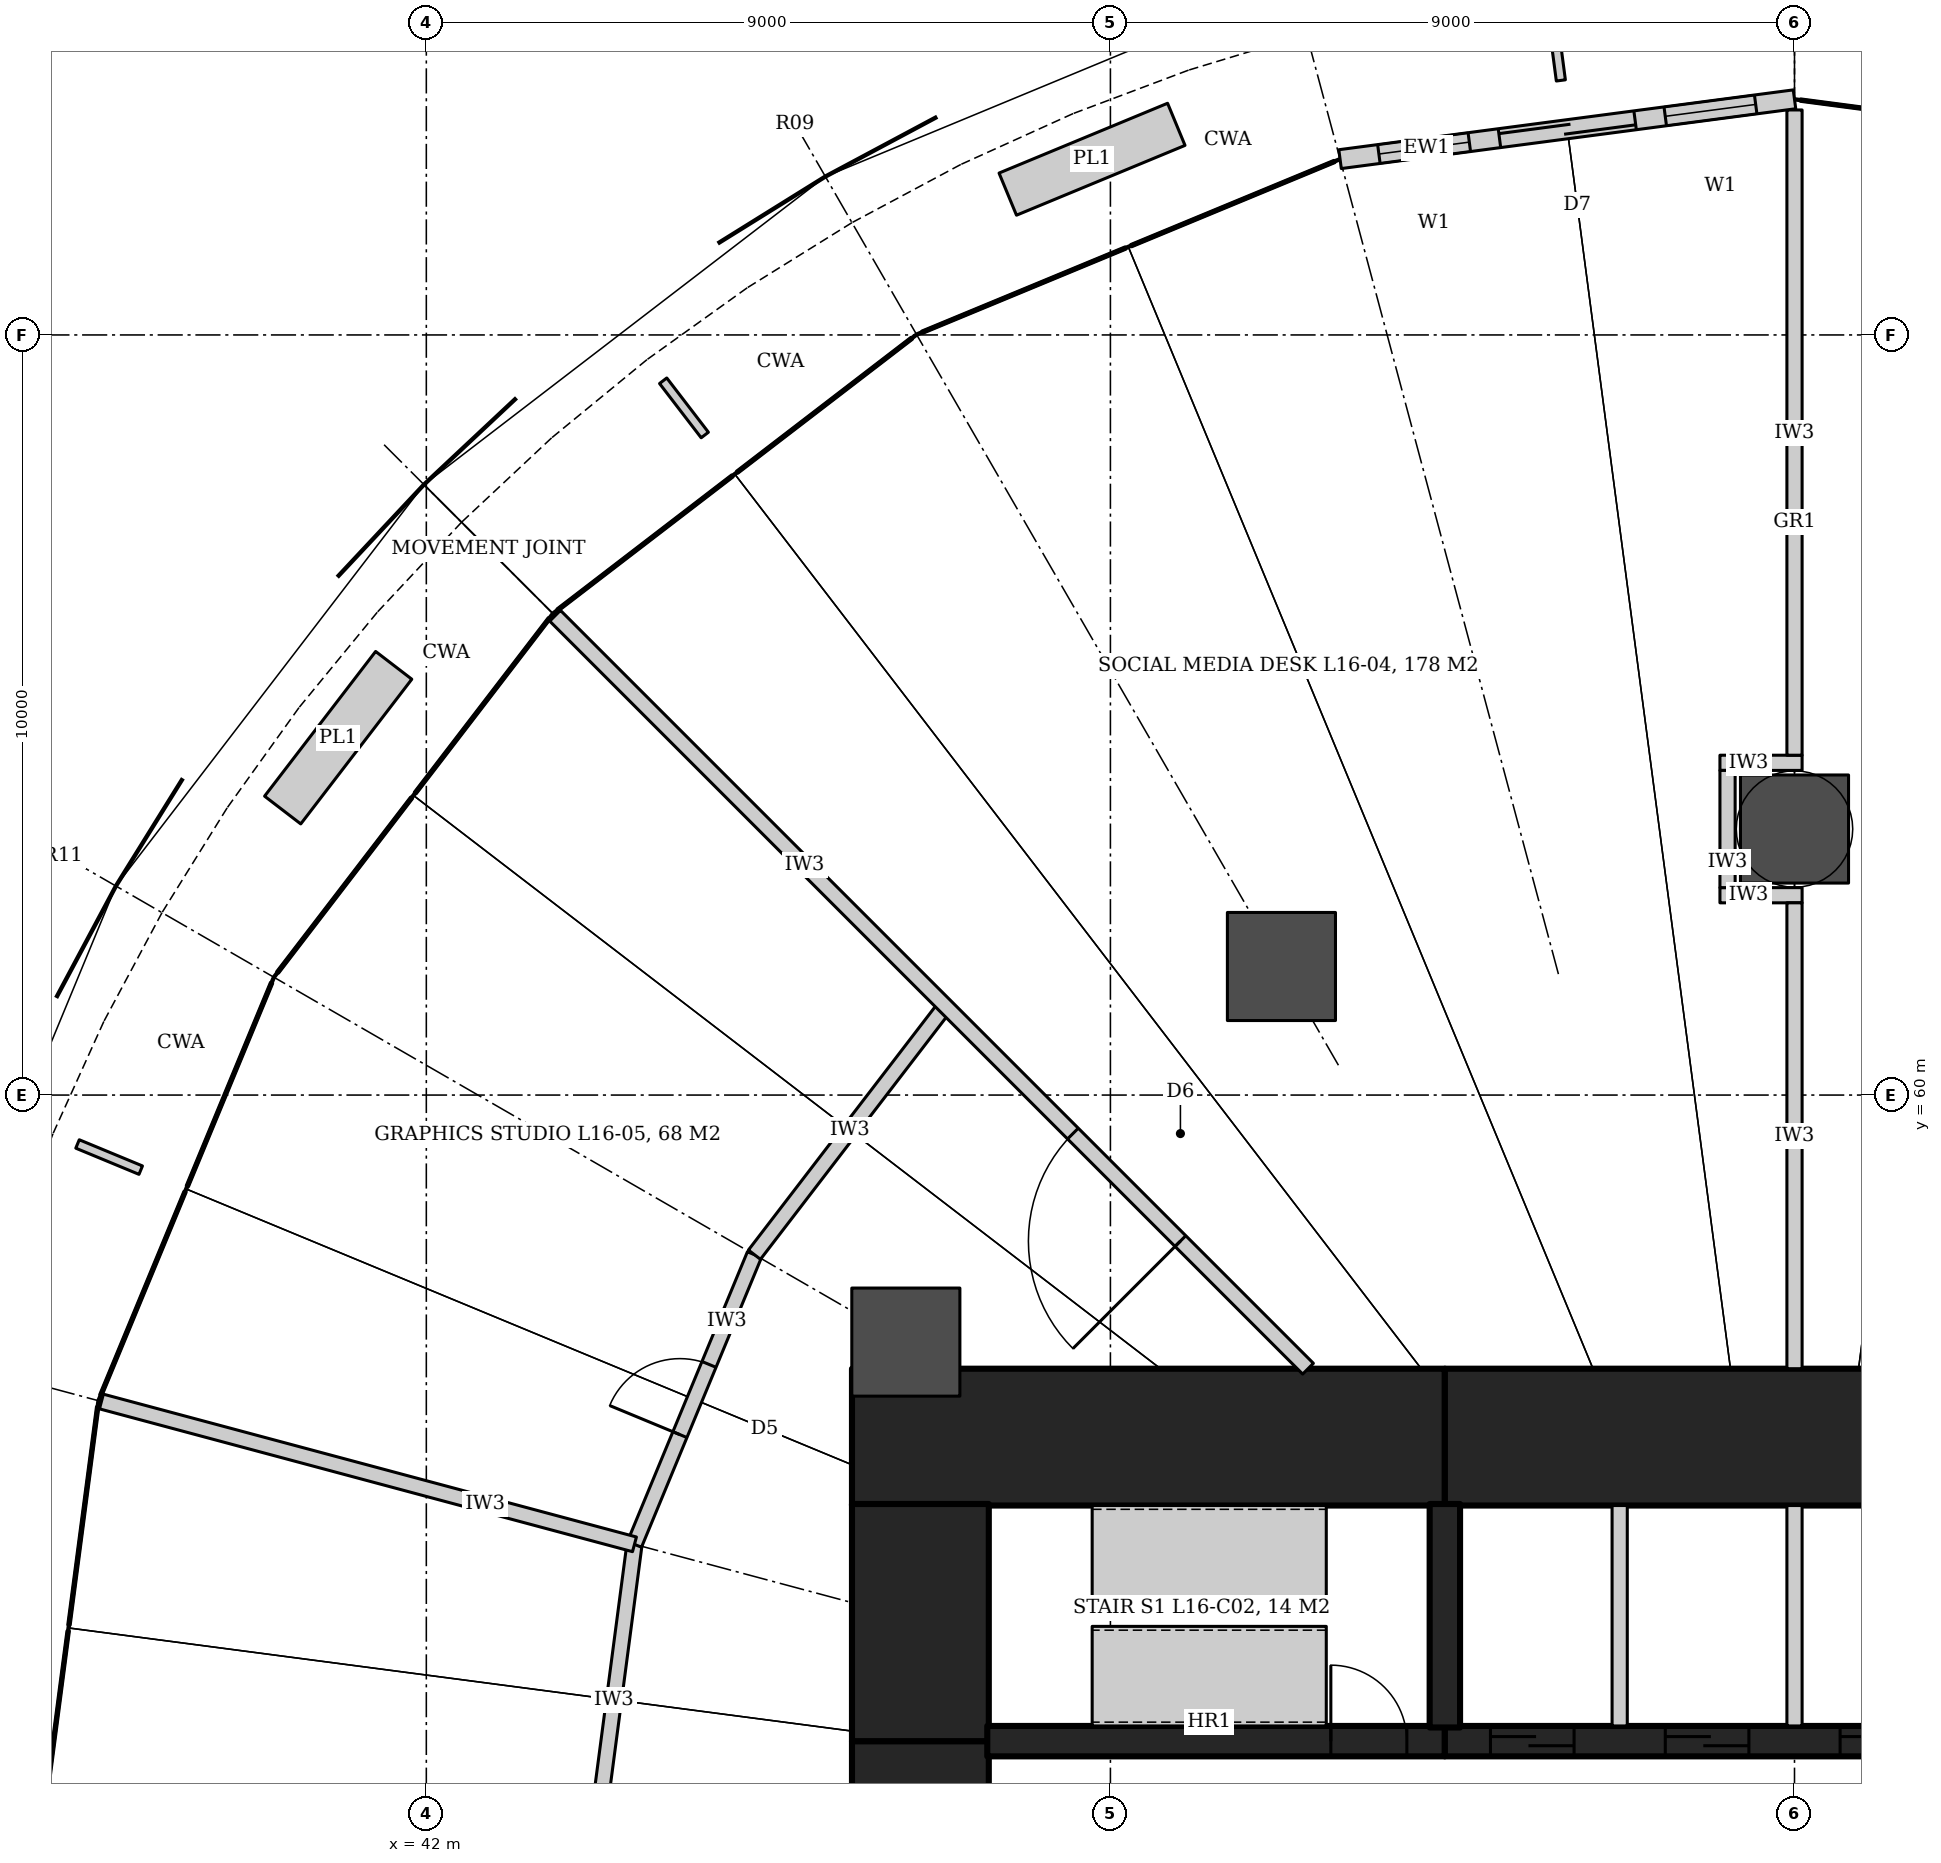
"""IFC4 building model, lengths in metres.
Left out: names, types, materials, properties, quantities, classifications, styles, units other than length and angle.
Written with IfcOpenShell. Run it as: python <this file> out.ifc"""

import sys

from ifc_helpers import new_model, si_unit, direction, frame, frame_2d, origin, origin_2d, place, context, subcontext, project, spatial, rectangle, hollow_circle, extrude, element, fill, save


model = new_model("IFC4")
c1 = context("Model", 3, precision=1e-05, world=origin(), true_north=direction((0.0, 1.0)))
c2 = subcontext(c1, "Body", "Model", "MODEL_VIEW")
j1 = project(units=[si_unit("LENGTHUNIT", "METRE"), si_unit("PLANEANGLEUNIT", "RADIAN")], contexts=[c1])
p1 = place(None, origin())
s1 = spatial("IfcSite", under=j1, at=p1, CompositionType="ELEMENT")
p2 = place(p1, origin())
s2 = spatial("IfcBuilding", under=s1, at=p2, CompositionType="ELEMENT")
p3 = place(p2, frame((0.0, 0.0, 68.0)))
s3 = spatial("IfcBuildingStorey", under=s2, at=p3, CompositionType="ELEMENT", Elevation=68.0)
p4 = place(p3, frame((47.6, 55.5, 0.0), z_axis=(0.0, 0.0, 1.0), x_axis=(1.0, 0.0, 0.0)))
e1 = element("IfcWall", 1, at=p4, inside=s3, PredefinedType="SHEAR", context=c2, shape_type="SweptSolid", body=[
    extrude(rectangle(XDim=7.8, YDim=1.8, at=frame_2d((3.9, 0.0))), origin(), (0.0, 0.0, 1.0), 4.2),
])
p5 = place(p3, frame((55.4, 55.5, 0.0), z_axis=(0.0, 0.0, 1.0), x_axis=(1.0, 0.0, 0.0)))
e2 = element("IfcWall", 2, at=p5, inside=s3, PredefinedType="SHEAR", context=c2, shape_type="SweptSolid", body=[
    extrude(rectangle(XDim=9.2, YDim=1.8, at=frame_2d((4.6, 0.0))), origin(), (0.0, 0.0, 1.0), 4.2),
])
p6 = place(p3, frame((48.5, 48.5, 0.0), z_axis=(0.0, 0.0, 1.0), x_axis=(0.0, 1.0, 0.0)))
e3 = element("IfcWall", 3, at=p6, inside=s3, PredefinedType="SHEAR", context=c2, shape_type="SweptSolid", body=[
    extrude(rectangle(XDim=3.0, YDim=1.8, at=frame_2d((1.5, 0.0))), origin(), (0.0, 0.0, 1.0), 4.2),
])
p7 = place(p6, frame((0.6, 0.0, 0.0)))
e4 = element("IfcOpeningElement", 4, at=p7, cuts=e3, PredefinedType="OPENING", context=c2, shape_type="SweptSolid", body=[
    extrude(rectangle(XDim=1.8, YDim=2.1, at=frame_2d((0.9, 1.05))), frame((0.0, 0.91, 0.0), z_axis=(0.0, -1.0, 0.0), x_axis=(1.0, 0.0, 0.0)), (0.0, 0.0, 1.0), 1.82),
])
p8 = place(p3, frame((48.5, 51.5, 0.0), z_axis=(0.0, 0.0, 1.0), x_axis=(0.0, 1.0, 0.0)))
e5 = element("IfcWall", 5, at=p8, inside=s3, PredefinedType="SHEAR", context=c2, shape_type="SweptSolid", body=[
    extrude(rectangle(XDim=3.12, YDim=1.8, at=frame_2d((1.56, 0.0))), origin(), (0.0, 0.0, 1.0), 4.2),
])
p9 = place(p3, frame((49.38, 51.5, 0.0), z_axis=(0.0, 0.0, 1.0), x_axis=(1.0, 0.0, 0.0)))
e6 = element("IfcWall", 6, at=p9, inside=s3, PredefinedType="SHEAR", context=c2, shape_type="SweptSolid", body=[
    extrude(rectangle(XDim=6.02, YDim=0.4, at=frame_2d((3.01, 0.0))), origin(), (0.0, 0.0, 1.0), 4.2),
])
p10 = place(p9, frame((4.52, 0.0, 0.0)))
e7 = element("IfcOpeningElement", 7, at=p10, cuts=e6, PredefinedType="OPENING", context=c2, shape_type="SweptSolid", body=[
    extrude(rectangle(XDim=1.0, YDim=2.1, at=frame_2d((0.5, 1.05))), frame((0.0, 0.21, 0.0), z_axis=(0.0, -1.0, 0.0), x_axis=(1.0, 0.0, 0.0)), (0.0, 0.0, 1.0), 0.42),
])
p11 = place(p3, frame((55.4, 51.5, 0.0), z_axis=(0.0, 0.0, 1.0), x_axis=(1.0, 0.0, 0.0)))
e8 = element("IfcWall", 8, at=p11, inside=s3, PredefinedType="SHEAR", context=c2, shape_type="SweptSolid", body=[
    extrude(rectangle(XDim=9.2, YDim=0.4, at=frame_2d((4.6, 0.0))), origin(), (0.0, 0.0, 1.0), 4.2),
])
p12 = place(p11, frame((0.6, 0.0, 0.0)))
e9 = element("IfcOpeningElement", 9, at=p12, cuts=e8, PredefinedType="OPENING", context=c2, shape_type="SweptSolid", body=[
    extrude(rectangle(XDim=1.1, YDim=2.1, at=frame_2d((0.55, 1.05))), frame((0.0, 0.21, 0.0), z_axis=(0.0, -1.0, 0.0), x_axis=(1.0, 0.0, 0.0)), (0.0, 0.0, 1.0), 0.42),
])
p13 = place(p11, frame((2.9, 0.0, 0.0)))
e10 = element("IfcOpeningElement", 10, at=p13, cuts=e8, PredefinedType="OPENING", context=c2, shape_type="SweptSolid", body=[
    extrude(rectangle(XDim=1.1, YDim=2.1, at=frame_2d((0.55, 1.05))), frame((0.0, 0.21, 0.0), z_axis=(0.0, -1.0, 0.0), x_axis=(1.0, 0.0, 0.0)), (0.0, 0.0, 1.0), 0.42),
])
p14 = place(p11, frame((5.2, 0.0, 0.0)))
e11 = element("IfcOpeningElement", 11, at=p14, cuts=e8, PredefinedType="OPENING", context=c2, shape_type="SweptSolid", body=[
    extrude(rectangle(XDim=1.1, YDim=2.1, at=frame_2d((0.55, 1.05))), frame((0.0, 0.21, 0.0), z_axis=(0.0, -1.0, 0.0), x_axis=(1.0, 0.0, 0.0)), (0.0, 0.0, 1.0), 0.42),
])
p15 = place(p11, frame((7.5, 0.0, 0.0)))
e12 = element("IfcOpeningElement", 12, at=p15, cuts=e8, PredefinedType="OPENING", context=c2, shape_type="SweptSolid", body=[
    extrude(rectangle(XDim=1.1, YDim=2.1, at=frame_2d((0.55, 1.05))), frame((0.0, 0.21, 0.0), z_axis=(0.0, -1.0, 0.0), x_axis=(1.0, 0.0, 0.0)), (0.0, 0.0, 1.0), 0.42),
])
p16 = place(p3, frame((55.4, 51.68, 0.0), z_axis=(0.0, 0.0, 1.0), x_axis=(0.0, 1.0, 0.0)))
e13 = element("IfcWall", 13, at=p16, inside=s3, PredefinedType="SHEAR", context=c2, shape_type="SweptSolid", body=[
    extrude(rectangle(XDim=2.94, YDim=0.4, at=frame_2d((1.47, 0.0))), origin(), (0.0, 0.0, 1.0), 4.2),
])
for number, where, z_axis, x_axis in (
    (14, (60.0, 63.5, 0.0), (0.0, 0.0, 1.0), (1.0, 0.0, 0.0)),
    (15, (53.25, 61.691, 0.0), (0.0, 0.0, 1.0), (1.0, 0.0, 0.0)),
    (16, (48.309, 56.75, 0.0), (0.0, 0.0, 1.0), (1.0, 0.0, 0.0)),
):
    element("IfcColumn", number, at=place(p3, frame(where, z_axis=z_axis, x_axis=x_axis)), inside=s3, PredefinedType="COLUMN", context=c2, shape_type="SweptSolid", body=[
        extrude(hollow_circle(Radius=0.711, WallThickness=0.07, at=origin_2d()), origin(), (0.0, 0.0, 1.0), 4.2),
    ])
p17 = place(p3, frame((44.2, 50.0, 0.0), z_axis=(0.0, 0.0, 1.0), x_axis=(0.130515758099, 0.991446234996, 0.0)))
e17 = element("IfcWall", 17, at=p17, inside=s3, PredefinedType="PARTITIONING", context=c2, shape_type="SweptSolid", body=[
    extrude(rectangle(XDim=4.125, YDim=0.2, at=frame_2d((2.062, 0.0))), origin(), (0.0, 0.0, 1.0), 3.04),
])
p18 = place(p3, frame((44.738, 54.089, 0.0), z_axis=(0.0, 0.0, 1.0), x_axis=(0.382731667114, 0.923859551549, 0.0)))
e18 = element("IfcWall", 18, at=p18, inside=s3, PredefinedType="PARTITIONING", context=c2, shape_type="SweptSolid", body=[
    extrude(rectangle(XDim=4.125, YDim=0.2, at=frame_2d((2.062, 0.0))), origin(), (0.0, 0.0, 1.0), 3.04),
])
p19 = place(p18, frame((1.562, 0.0, 0.0)))
e19 = element("IfcOpeningElement", 19, at=p19, cuts=e18, PredefinedType="OPENING", context=c2, shape_type="SweptSolid", body=[
    extrude(rectangle(XDim=1.0, YDim=2.1, at=frame_2d((0.5, 1.05))), frame((0.0, 0.11, 0.0), z_axis=(0.0, -1.0, 0.0), x_axis=(1.0, 0.0, 0.0)), (0.0, 0.0, 1.0), 0.22),
])
p20 = place(p3, frame((46.317, 57.9, 0.0), z_axis=(0.0, 0.0, 1.0), x_axis=(0.608714823874, 0.793389099494, 0.0)))
e20 = element("IfcWall", 20, at=p20, inside=s3, PredefinedType="PARTITIONING", context=c2, shape_type="SweptSolid", body=[
    extrude(rectangle(XDim=4.125, YDim=0.2, at=frame_2d((2.062, 0.0))), origin(), (0.0, 0.0, 1.0), 3.04),
])
for number, where, z_axis, x_axis in (
    (21, (60.1, 62.629, 0.0), (0.0, 0.0, 1.0), (-1.0, 0.0, 0.0)),
    (22, (60.1, 64.371, 0.0), (0.0, 0.0, 1.0), (-1.0, 0.0, 0.0)),
):
    element("IfcWall", number, at=place(p3, frame(where, z_axis=z_axis, x_axis=x_axis)), inside=s3, PredefinedType="PARTITIONING", context=c2, shape_type="SweptSolid", body=[
        extrude(rectangle(XDim=1.081, YDim=0.2, at=frame_2d((0.541, 0.0))), origin(), (0.0, 0.0, 1.0), 3.02),
    ])
p21 = place(p3, frame((59.119, 62.729, 0.0), z_axis=(0.0, 0.0, 1.0), x_axis=(0.0, 1.0, 0.0)))
e23 = element("IfcWall", 23, at=p21, inside=s3, PredefinedType="PARTITIONING", context=c2, shape_type="SweptSolid", body=[
    extrude(rectangle(XDim=1.542, YDim=0.2, at=frame_2d((0.771, 0.0))), origin(), (0.0, 0.0, 1.0), 3.02),
])
p22 = place(p3, frame((60.0, 56.4, 0.0), z_axis=(0.0, 0.0, 1.0), x_axis=(0.0, 1.0, 0.0)))
e24 = element("IfcWall", 24, at=p22, inside=s3, PredefinedType="PARTITIONING", context=c2, shape_type="SweptSolid", body=[
    extrude(rectangle(XDim=6.129, YDim=0.2, at=frame_2d((3.064, 0.0))), origin(), (0.0, 0.0, 1.0), 3.04),
])
p23 = place(p3, frame((60.0, 64.471, 0.0), z_axis=(0.0, 0.0, 1.0), x_axis=(0.0, 1.0, 0.0)))
e25 = element("IfcWall", 25, at=p23, inside=s3, PredefinedType="PARTITIONING", context=c2, shape_type="SweptSolid", body=[
    extrude(rectangle(XDim=8.389, YDim=0.2, at=frame_2d((4.195, 0.0))), origin(), (0.0, 0.0, 1.0), 3.04),
])
p24 = place(p3, frame((53.6, 56.4, 0.0), z_axis=(0.0, 0.0, 1.0), x_axis=(-0.707106781187, 0.707106781187, 0.0)))
e26 = element("IfcWall", 26, at=p24, inside=s3, PredefinedType="PARTITIONING", context=c2, shape_type="SweptSolid", body=[
    extrude(rectangle(XDim=13.909, YDim=0.2, at=frame_2d((6.955, 0.0))), origin(), (0.0, 0.0, 1.0), 3.02),
])
p25 = place(p24, frame((2.375, 0.0, 0.0)))
e27 = element("IfcOpeningElement", 27, at=p25, cuts=e26, PredefinedType="OPENING", context=c2, shape_type="SweptSolid", body=[
    extrude(rectangle(XDim=2.0, YDim=2.1, at=frame_2d((1.0, 1.05))), frame((0.0, 0.11, 0.0), z_axis=(0.0, -1.0, 0.0), x_axis=(1.0, 0.0, 0.0)), (0.0, 0.0, 1.0), 0.22),
])
p26 = place(p3, frame((44.738, 54.089, 0.0), z_axis=(0.0, 0.0, 1.0), x_axis=(-0.965929787715, 0.258804260405, 0.0)))
e28 = element("IfcWall", 28, at=p26, inside=s3, PredefinedType="PARTITIONING", context=c2, shape_type="SweptSolid", body=[
    extrude(rectangle(XDim=7.16, YDim=0.2, at=frame_2d((3.58, 0.0))), origin(), (0.0, 0.0, 1.0), 3.04),
])
p27 = place(p3, frame((60.0, 73.0, 0.0), z_axis=(0.0, 0.0, 1.0), x_axis=(-0.991445297315, -0.130522880875, 0.0)))
e29 = element("IfcWall", 29, at=p27, inside=s3, PredefinedType="SOLIDWALL", context=c2, shape_type="SweptSolid", body=[
    extrude(rectangle(XDim=6.004, YDim=0.25, at=frame_2d((3.002, 0.0))), origin(), (0.0, 0.0, 1.0), 4.04),
])
p28 = place(p27, frame((2.102, 0.0, 0.0)))
e30 = element("IfcOpeningElement", 30, at=p28, cuts=e29, PredefinedType="OPENING", context=c2, shape_type="SweptSolid", body=[
    extrude(rectangle(XDim=1.8, YDim=2.4, at=frame_2d((0.9, 1.2))), frame((0.0, 0.135, 0.0), z_axis=(0.0, -1.0, 0.0), x_axis=(1.0, 0.0, 0.0)), (0.0, 0.0, 1.0), 0.27),
])
p29 = place(p27, frame((0.502, 0.0, 0.0)))
e31 = element("IfcOpeningElement", 31, at=p29, cuts=e29, PredefinedType="OPENING", context=c2, shape_type="SweptSolid", body=[
    extrude(rectangle(XDim=1.2, YDim=2.4, at=frame_2d((0.6, 1.2))), frame((0.0, 0.135, 0.0), z_axis=(0.0, -1.0, 0.0), x_axis=(1.0, 0.0, 0.0)), (0.0, 0.0, 1.0), 0.27),
])
p30 = place(p27, frame((4.302, 0.0, 0.0)))
e32 = element("IfcOpeningElement", 32, at=p30, cuts=e29, PredefinedType="OPENING", context=c2, shape_type="SweptSolid", body=[
    extrude(rectangle(XDim=1.2, YDim=2.4, at=frame_2d((0.6, 1.2))), frame((0.0, 0.135, 0.0), z_axis=(0.0, -1.0, 0.0), x_axis=(1.0, 0.0, 0.0)), (0.0, 0.0, 1.0), 0.27),
])
for number, where, z_axis, x_axis in (
    (33, (57.7, 51.7, 0.0), (0.0, 0.0, 1.0), (0.0, 1.0, 0.0)),
    (34, (60.0, 51.7, 0.0), (0.0, 0.0, 1.0), (0.0, 1.0, 0.0)),
):
    element("IfcWall", number, at=place(p3, frame(where, z_axis=z_axis, x_axis=x_axis)), inside=s3, PredefinedType="PARTITIONING", context=c2, shape_type="SweptSolid", body=[
        extrude(rectangle(XDim=2.9, YDim=0.2, at=frame_2d((1.45, 0.0))), origin(), (0.0, 0.0, 1.0), 4.2),
    ])
p31 = place(p25, origin())
e35 = element("IfcDoor", 35, at=p31, inside=s3, OperationType="DOUBLE_DOOR_DOUBLE_SWING", PredefinedType="DOOR", context=c2, shape_type="SweptSolid", body=[
    extrude(rectangle(XDim=2.0, YDim=2.1, at=frame_2d((1.0, 1.05))), frame((0.0, 0.025, 0.0), z_axis=(0.0, -1.0, 0.0), x_axis=(1.0, 0.0, 0.0)), (0.0, 0.0, 1.0), 0.05),
])
fill(e27, e35)
p32 = place(p19, origin())
e36 = element("IfcDoor", 36, at=p32, inside=s3, OperationType="SINGLE_SWING_LEFT", PredefinedType="DOOR", context=c2, shape_type="SweptSolid", body=[
    extrude(rectangle(XDim=1.0, YDim=2.1, at=frame_2d((0.5, 1.05))), frame((0.0, 0.025, 0.0), z_axis=(0.0, -1.0, 0.0), x_axis=(1.0, 0.0, 0.0)), (0.0, 0.0, 1.0), 0.05),
])
fill(e19, e36)
p33 = place(p28, origin())
e37 = element("IfcDoor", 37, at=p33, inside=s3, OperationType="DOUBLE_DOOR_SLIDING", PredefinedType="DOOR", context=c2, shape_type="SweptSolid", body=[
    extrude(rectangle(XDim=1.8, YDim=2.4, at=frame_2d((0.9, 1.2))), frame((0.0, 0.025, 0.0), z_axis=(0.0, -1.0, 0.0), x_axis=(1.0, 0.0, 0.0)), (0.0, 0.0, 1.0), 0.05),
])
fill(e30, e37)
p34 = place(p29, origin())
e38 = element("IfcWindow", 38, at=p34, inside=s3, PartitioningType="SINGLE_PANEL", PredefinedType="WINDOW", context=c2, shape_type="SweptSolid", body=[
    extrude(rectangle(XDim=1.2, YDim=2.4, at=frame_2d((0.6, 1.2))), frame((0.0, 0.03, 0.0), z_axis=(0.0, -1.0, 0.0), x_axis=(1.0, 0.0, 0.0)), (0.0, 0.0, 1.0), 0.06),
])
fill(e31, e38)
p35 = place(p30, origin())
e39 = element("IfcWindow", 39, at=p35, inside=s3, PartitioningType="SINGLE_PANEL", PredefinedType="WINDOW", context=c2, shape_type="SweptSolid", body=[
    extrude(rectangle(XDim=1.2, YDim=2.4, at=frame_2d((0.6, 1.2))), frame((0.0, 0.03, 0.0), z_axis=(0.0, -1.0, 0.0), x_axis=(1.0, 0.0, 0.0)), (0.0, 0.0, 1.0), 0.06),
])
fill(e32, e39)
p36 = place(p10, origin())
e40 = element("IfcDoor", 40, at=p36, inside=s3, OperationType="SINGLE_SWING_LEFT", PredefinedType="DOOR", context=c2, shape_type="SweptSolid", body=[
    extrude(rectangle(XDim=1.0, YDim=2.1, at=frame_2d((0.5, 1.05))), frame((0.0, 0.025, 0.0), z_axis=(0.0, -1.0, 0.0), x_axis=(1.0, 0.0, 0.0)), (0.0, 0.0, 1.0), 0.05),
])
fill(e7, e40)
p37 = place(p12, origin())
e41 = element("IfcDoor", 41, at=p37, inside=s3, OperationType="SLIDING_TO_LEFT", PredefinedType="DOOR", context=c2, shape_type="SweptSolid", body=[
    extrude(rectangle(XDim=1.1, YDim=2.1, at=frame_2d((0.55, 1.05))), frame((0.0, 0.025, 0.0), z_axis=(0.0, -1.0, 0.0), x_axis=(1.0, 0.0, 0.0)), (0.0, 0.0, 1.0), 0.05),
])
fill(e9, e41)
p38 = place(p13, origin())
e42 = element("IfcDoor", 42, at=p38, inside=s3, OperationType="SLIDING_TO_LEFT", PredefinedType="DOOR", context=c2, shape_type="SweptSolid", body=[
    extrude(rectangle(XDim=1.1, YDim=2.1, at=frame_2d((0.55, 1.05))), frame((0.0, 0.025, 0.0), z_axis=(0.0, -1.0, 0.0), x_axis=(1.0, 0.0, 0.0)), (0.0, 0.0, 1.0), 0.05),
])
fill(e10, e42)
p39 = place(p14, origin())
e43 = element("IfcDoor", 43, at=p39, inside=s3, OperationType="SLIDING_TO_LEFT", PredefinedType="DOOR", context=c2, shape_type="SweptSolid", body=[
    extrude(rectangle(XDim=1.1, YDim=2.1, at=frame_2d((0.55, 1.05))), frame((0.0, 0.025, 0.0), z_axis=(0.0, -1.0, 0.0), x_axis=(1.0, 0.0, 0.0)), (0.0, 0.0, 1.0), 0.05),
])
fill(e11, e43)
save(model, sys.argv[1])
